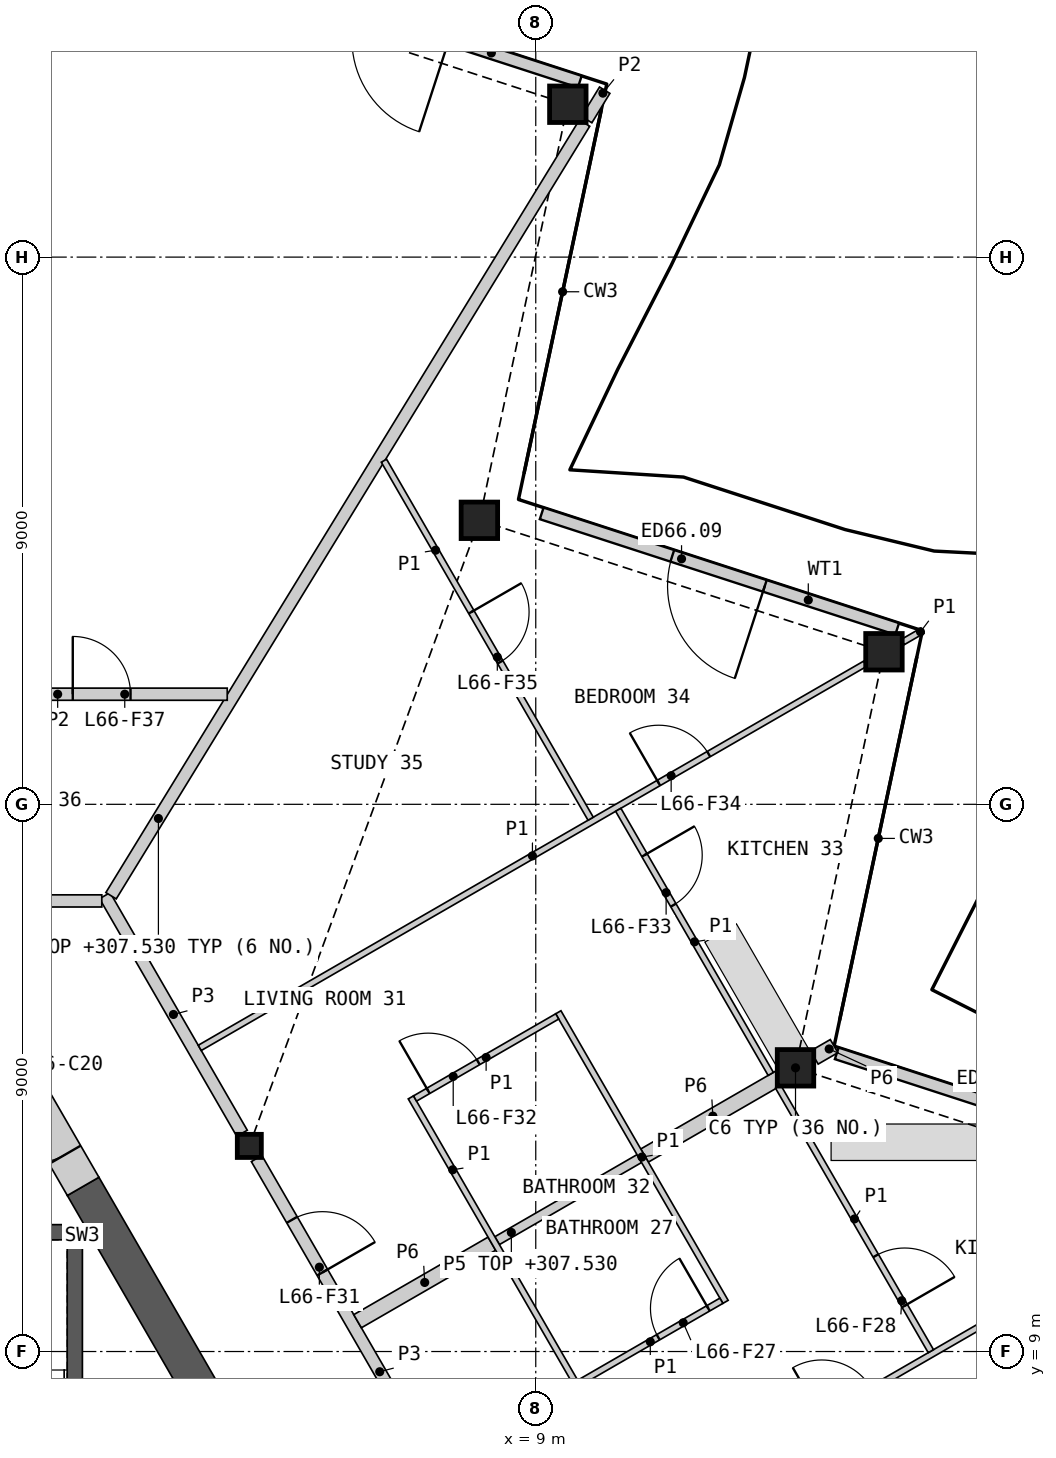
"""IFC4 building model, lengths in metres.
Left out: names, types, materials, properties, quantities, classifications, styles, units other than length and angle.
Written with IfcOpenShell. Run it as: python <this file> out.ifc"""

import sys

from ifc_helpers import new_model, si_unit, direction, frame, frame_2d, origin, origin_2d, place, context, subcontext, project, spatial, polyline, rectangle, hollow_rectangle, i_section, outline, extrude, element, fill, save


model = new_model("IFC4")
c1 = context("Model", 3, precision=1e-05, world=origin(), true_north=direction((0.0, 1.0)))
c2 = subcontext(c1, "Body", "Model", "MODEL_VIEW")
j1 = project(units=[si_unit("LENGTHUNIT", "METRE"), si_unit("PLANEANGLEUNIT", "RADIAN")], contexts=[c1])
p1 = place(None, origin())
s1 = spatial("IfcSite", under=j1, at=p1, CompositionType="ELEMENT")
p2 = place(p1, origin())
s2 = spatial("IfcBuilding", under=s1, at=p2, CompositionType="ELEMENT")
p3 = place(p2, frame((0.0, 0.0, 305.2)))
s3 = spatial("IfcBuildingStorey", under=s2, at=p3, CompositionType="ELEMENT", Elevation=305.2)
for number, where, z_axis, x_axis in (
    (1, (13.272, 13.666, 0.0), (0.0, 0.0, 1.0), (1.0, 0.0, 0.0)),
    (2, (14.727, 20.509, 0.0), (0.0, 0.0, 1.0), (1.0, 0.0, 0.0)),
    (3, (8.073, 22.671, 0.0), (0.0, 0.0, 1.0), (1.0, 0.0, 0.0)),
    (4, (9.527, 29.514, 0.0), (0.0, 0.0, 1.0), (1.0, 0.0, 0.0)),
):
    element("IfcColumn", number, at=place(p3, frame(where, z_axis=z_axis, x_axis=x_axis)), inside=s3, PredefinedType="COLUMN", context=c2, shape_type="SweptSolid", body=[
        extrude(hollow_rectangle(XDim=0.6, YDim=0.6, WallThickness=0.04, at=origin_2d()), origin(), (0.0, 0.0, 1.0), 3.4),
    ])
p4 = place(p3, frame((4.289, 12.382, 0.0), z_axis=(0.0, 0.0, 1.0), x_axis=(1.0, 0.0, 0.0)))
e5 = element("IfcColumn", 5, at=p4, inside=s3, PredefinedType="COLUMN", context=c2, shape_type="SweptSolid", body=[
    extrude(i_section(OverallWidth=0.396, OverallDepth=0.381, WebThickness=0.019, FlangeThickness=0.03, at=origin_2d()), origin(), (0.0, 0.0, 1.0), 3.4),
])
p5 = place(p3, frame((20.178, 11.88, 0.0), z_axis=(0.0, 0.0, 1.0), x_axis=(-0.951053245104, 0.309027061884, 0.0)))
e6 = element("IfcWall", 6, at=p5, inside=s3, PredefinedType="SOLIDWALL", context=c2, shape_type="SweptSolid", body=[
    extrude(rectangle(XDim=6.549, YDim=0.2, at=frame_2d((3.274, 0.0))), origin(), (0.0, 0.0, 1.0), 2.488),
])
p6 = place(p5, frame((2.334, 0.0, 0.0)))
e7 = element("IfcOpeningElement", 7, at=p6, cuts=e6, PredefinedType="OPENING", context=c2, shape_type="SweptSolid", body=[
    extrude(rectangle(XDim=1.6, YDim=2.25, at=frame_2d((0.8, 1.125))), frame((0.0, 0.11, 0.0), z_axis=(0.0, -1.0, 0.0), x_axis=(1.0, 0.0, 0.0)), (0.0, 0.0, 1.0), 0.22),
])
p7 = place(p3, frame((14.944, 20.885, 0.0), z_axis=(0.0, 0.0, 1.0), x_axis=(-0.951062668065, 0.308998060534, 0.0)))
e8 = element("IfcWall", 8, at=p7, inside=s3, PredefinedType="SOLIDWALL", context=c2, shape_type="SweptSolid", body=[
    extrude(rectangle(XDim=6.147, YDim=0.2, at=frame_2d((3.073, 0.0))), origin(), (0.0, 0.0, 1.0), 2.488),
])
p8 = place(p7, frame((2.288, 0.0, 0.0)))
e9 = element("IfcOpeningElement", 9, at=p8, cuts=e8, PredefinedType="OPENING", context=c2, shape_type="SweptSolid", body=[
    extrude(rectangle(XDim=1.6, YDim=2.25, at=frame_2d((0.8, 1.125))), frame((0.0, 0.11, 0.0), z_axis=(0.0, -1.0, 0.0), x_axis=(1.0, 0.0, 0.0)), (0.0, 0.0, 1.0), 0.22),
])
p9 = place(p3, frame((9.724, 29.885, 0.0), z_axis=(0.0, 0.0, 1.0), x_axis=(-0.951066325824, 0.30898680212, 0.0)))
e10 = element("IfcWall", 10, at=p9, inside=s3, PredefinedType="SOLIDWALL", context=c2, shape_type="SweptSolid", body=[
    extrude(rectangle(XDim=6.117, YDim=0.2, at=frame_2d((3.059, 0.0))), origin(), (0.0, 0.0, 1.0), 2.488),
])
p10 = place(p9, frame((2.259, 0.0, 0.0)))
e11 = element("IfcOpeningElement", 11, at=p10, cuts=e10, PredefinedType="OPENING", context=c2, shape_type="SweptSolid", body=[
    extrude(rectangle(XDim=1.6, YDim=2.25, at=frame_2d((0.8, 1.125))), frame((0.0, 0.11, 0.0), z_axis=(0.0, -1.0, 0.0), x_axis=(1.0, 0.0, 0.0)), (0.0, 0.0, 1.0), 0.22),
])
p11 = place(p3, origin())
e12 = element("IfcWall", 12, at=p11, inside=s3, PredefinedType="SHEAR", context=c2, shape_type="SweptSolid", body=[
    extrude(outline(polyline([(1.544, 5.237), (1.544, 11.087), (1.294, 10.837), (1.294, 5.237), (1.544, 5.237)])), origin(), (0.0, 0.0, 1.0), 3.1),
])
p12 = place(p3, origin())
e13 = element("IfcWall", 13, at=p12, inside=s3, PredefinedType="SHEAR", context=c2, shape_type="SweptSolid", body=[
    extrude(outline(polyline([(1.544, 11.087), (-1.544, 11.087), (-1.294, 10.837), (1.294, 10.837), (1.544, 11.087)])), origin(), (0.0, 0.0, 1.0), 3.1),
])
p13 = place(p3, frame((8.841, -0.902, 0.0), z_axis=(0.0, 0.0, 1.0), x_axis=(-0.499995618375, 0.866027933502, 0.0)))
e14 = element("IfcWall", 14, at=p13, inside=s3, PredefinedType="SHEAR", context=c2, shape_type="SweptSolid", body=[
    extrude(rectangle(XDim=14.571, YDim=0.6, at=frame_2d((7.285, 0.0))), origin(), (0.0, 0.0, 1.0), 3.1),
])
p14 = place(p3, frame((1.556, 11.716, 0.0), z_axis=(0.0, 0.0, 1.0), x_axis=(-0.500018667571, 0.866014625789, 0.0)))
e15 = element("IfcWall", 15, at=p14, inside=s3, PredefinedType="SHEAR", context=c2, shape_type="SweptSolid", body=[
    extrude(rectangle(XDim=2.592, YDim=0.6, at=frame_2d((1.296, 0.0))), origin(), (0.0, 0.0, 1.0), 3.1),
])
p15 = place(p14, frame((0.6, 0.0, 0.0)))
e16 = element("IfcOpeningElement", 16, at=p15, cuts=e15, PredefinedType="OPENING", context=c2, shape_type="SweptSolid", body=[
    extrude(rectangle(XDim=1.0, YDim=2.1, at=frame_2d((0.5, 1.05))), frame((0.0, 0.31, 0.0), z_axis=(0.0, -1.0, 0.0), x_axis=(1.0, 0.0, 0.0)), (0.0, 0.0, 1.0), 0.62),
])
p16 = place(p3, frame((4.409, 12.174, 0.0), z_axis=(0.0, 0.0, 1.0), x_axis=(0.499984266882, -0.866034487114, 0.0)))
e17 = element("IfcWall", 17, at=p16, inside=s3, PredefinedType="PARTITIONING", context=c2, shape_type="SweptSolid", body=[
    extrude(rectangle(XDim=8.099, YDim=0.2, at=frame_2d((4.049, 0.0))), origin(), (0.0, 0.0, 1.0), 3.1),
])
p17 = place(p16, frame((5.123, 0.0, 0.0)))
e18 = element("IfcOpeningElement", 18, at=p17, cuts=e17, PredefinedType="OPENING", context=c2, shape_type="SweptSolid", body=[
    extrude(rectangle(XDim=1.0, YDim=2.1, at=frame_2d((0.5, 1.05))), frame((0.0, 0.11, 0.0), z_axis=(0.0, -1.0, 0.0), x_axis=(1.0, 0.0, 0.0)), (0.0, 0.0, 1.0), 0.22),
])
p18 = place(p16, frame((1.164, 0.0, 0.0)))
e19 = element("IfcOpeningElement", 19, at=p18, cuts=e17, PredefinedType="OPENING", context=c2, shape_type="SweptSolid", body=[
    extrude(rectangle(XDim=1.0, YDim=2.1, at=frame_2d((0.5, 1.05))), frame((0.0, 0.11, 0.0), z_axis=(0.0, -1.0, 0.0), x_axis=(1.0, 0.0, 0.0)), (0.0, 0.0, 1.0), 0.22),
])
p19 = place(p3, frame((1.913, 16.498, 0.0), z_axis=(0.0, 0.0, 1.0), x_axis=(0.499950370306, -0.866054055606, 0.0)))
e20 = element("IfcWall", 20, at=p19, inside=s3, PredefinedType="PARTITIONING", context=c2, shape_type="SweptSolid", body=[
    extrude(rectangle(XDim=4.513, YDim=0.2, at=frame_2d((2.256, 0.0))), origin(), (0.0, 0.0, 1.0), 3.1),
])
p20 = place(p3, frame((-1.863, 16.411, 0.0), z_axis=(0.0, 0.0, 1.0), x_axis=(1.0, 0.0, 0.0)))
e21 = element("IfcWall", 21, at=p20, inside=s3, PredefinedType="PARTITIONING", context=c2, shape_type="SweptSolid", body=[
    extrude(rectangle(XDim=3.726, YDim=0.2, at=frame_2d((1.863, 0.0))), origin(), (0.0, 0.0, 1.0), 3.1),
])
p21 = place(p20, frame((1.388, 0.0, 0.0)))
e22 = element("IfcOpeningElement", 22, at=p21, cuts=e21, PredefinedType="OPENING", context=c2, shape_type="SweptSolid", body=[
    extrude(rectangle(XDim=0.95, YDim=2.1, at=frame_2d((0.475, 1.05))), frame((0.0, 0.11, 0.0), z_axis=(0.0, -1.0, 0.0), x_axis=(1.0, 0.0, 0.0)), (0.0, 0.0, 1.0), 0.22),
])
p22 = place(p3, frame((6.07, 9.498, 0.0), z_axis=(0.0, 0.0, 1.0), x_axis=(0.866054858364, 0.499948979701, 0.0)))
e23 = element("IfcWall", 23, at=p22, inside=s3, PredefinedType="PARTITIONING", context=c2, shape_type="SweptSolid", body=[
    extrude(rectangle(XDim=2.55, YDim=0.25, at=frame_2d((1.275, 0.0))), origin(), (0.0, 0.0, 1.0), 2.33),
])
p23 = place(p3, frame((10.789, 12.223, 0.0), z_axis=(0.0, 0.0, 1.0), x_axis=(0.866033547976, 0.499985893582, 0.0)))
e24 = element("IfcWall", 24, at=p23, inside=s3, PredefinedType="PARTITIONING", context=c2, shape_type="SweptSolid", body=[
    extrude(rectangle(XDim=2.594, YDim=0.25, at=frame_2d((1.297, 0.0))), origin(), (0.0, 0.0, 1.0), 2.33),
])
p24 = place(p3, frame((13.582, 13.835, 0.0), z_axis=(0.0, 0.0, 1.0), x_axis=(0.865827443207, 0.500342721131, 0.0)))
e25 = element("IfcWall", 25, at=p24, inside=s3, PredefinedType="PARTITIONING", context=c2, shape_type="SweptSolid", body=[
    extrude(rectangle(XDim=0.375, YDim=0.25, at=frame_2d((0.188, 0.0))), origin(), (0.0, 0.0, 1.0), 2.33),
])
p25 = place(p3, frame((2.015, 16.496, 0.0), z_axis=(0.0, 0.0, 1.0), x_axis=(0.522487920222, 0.852646687217, 0.0)))
e26 = element("IfcWall", 26, at=p25, inside=s3, PredefinedType="PARTITIONING", context=c2, shape_type="SweptSolid", body=[
    extrude(rectangle(XDim=14.904, YDim=0.2, at=frame_2d((7.452, 0.0))), origin(), (0.0, 0.0, 1.0), 2.33),
])
p26 = place(p3, frame((0.208, 19.811, 0.0), z_axis=(0.0, 0.0, 1.0), x_axis=(1.0, 0.0, 0.0)))
e27 = element("IfcWall", 27, at=p26, inside=s3, PredefinedType="PARTITIONING", context=c2, shape_type="SweptSolid", body=[
    extrude(rectangle(XDim=3.718, YDim=0.2, at=frame_2d((1.859, 0.0))), origin(), (0.0, 0.0, 1.0), 2.33),
])
p27 = place(p26, frame((1.178, 0.0, 0.0)))
e28 = element("IfcOpeningElement", 28, at=p27, cuts=e27, PredefinedType="OPENING", context=c2, shape_type="SweptSolid", body=[
    extrude(rectangle(XDim=0.95, YDim=2.1, at=frame_2d((0.475, 1.05))), frame((0.0, 0.11, 0.0), z_axis=(0.0, -1.0, 0.0), x_axis=(1.0, 0.0, 0.0)), (0.0, 0.0, 1.0), 0.22),
])
p28 = place(p3, frame((9.837, 29.261, 0.0), z_axis=(0.0, 0.0, 1.0), x_axis=(0.5225115935, 0.852632180168, 0.0)))
e29 = element("IfcWall", 29, at=p28, inside=s3, PredefinedType="PARTITIONING", context=c2, shape_type="SweptSolid", body=[
    extrude(rectangle(XDim=0.567, YDim=0.2, at=frame_2d((0.284, 0.0))), origin(), (0.0, 0.0, 1.0), 2.33),
])
p29 = place(p3, frame((8.365, 10.823, 0.0), z_axis=(0.0, 0.0, 1.0), x_axis=(0.866019956843, 0.50000943426, 0.0)))
e30 = element("IfcWall", 30, at=p29, inside=s3, PredefinedType="PLUMBINGWALL", context=c2, shape_type="SweptSolid", body=[
    extrude(rectangle(XDim=2.7, YDim=0.15, at=frame_2d((1.35, 0.0))), origin(), (0.0, 0.0, 1.0), 2.33),
])
p30 = place(p3, frame((3.474, 13.994, 0.0), z_axis=(0.0, 0.0, 1.0), x_axis=(0.866032424046, 0.499987840353, 0.0)))
e31 = element("IfcWall", 31, at=p30, inside=s3, PredefinedType="PARTITIONING", context=c2, shape_type="SweptSolid", body=[
    extrude(rectangle(XDim=12.635, YDim=0.1, at=frame_2d((6.317, 0.0))), origin(), (0.0, 0.0, 1.0), 2.33),
])
p31 = place(p30, frame((8.714, 0.0, 0.0)))
e32 = element("IfcOpeningElement", 32, at=p31, cuts=e31, PredefinedType="OPENING", context=c2, shape_type="SweptSolid", body=[
    extrude(rectangle(XDim=0.95, YDim=2.1, at=frame_2d((0.475, 1.05))), frame((0.0, 0.06, 0.0), z_axis=(0.0, -1.0, 0.0), x_axis=(1.0, 0.0, 0.0)), (0.0, 0.0, 1.0), 0.12),
])
p32 = place(p3, frame((8.786, 5.073, 0.0), z_axis=(0.0, 0.0, 1.0), x_axis=(0.86602139559, 0.500006942333, 0.0)))
e33 = element("IfcWall", 33, at=p32, inside=s3, PredefinedType="PARTITIONING", context=c2, shape_type="SweptSolid", body=[
    extrude(rectangle(XDim=12.505, YDim=0.1, at=frame_2d((6.252, 0.0))), origin(), (0.0, 0.0, 1.0), 2.33),
])
p33 = place(p32, frame((5.677, 0.0, 0.0)))
e34 = element("IfcOpeningElement", 34, at=p33, cuts=e33, PredefinedType="OPENING", context=c2, shape_type="SweptSolid", body=[
    extrude(rectangle(XDim=0.95, YDim=2.1, at=frame_2d((0.475, 1.05))), frame((0.0, 0.06, 0.0), z_axis=(0.0, -1.0, 0.0), x_axis=(1.0, 0.0, 0.0)), (0.0, 0.0, 1.0), 0.12),
])
p34 = place(p3, frame((6.503, 23.652, 0.0), z_axis=(0.0, 0.0, 1.0), x_axis=(0.50002393615, -0.866011583801, 0.0)))
e35 = element("IfcWall", 35, at=p34, inside=s3, PredefinedType="PARTITIONING", context=c2, shape_type="SweptSolid", body=[
    extrude(rectangle(XDim=6.8, YDim=0.1, at=frame_2d((3.4, 0.0))), origin(), (0.0, 0.0, 1.0), 2.33),
])
p35 = place(p34, frame((2.874, 0.0, 0.0)))
e36 = element("IfcOpeningElement", 36, at=p35, cuts=e35, PredefinedType="OPENING", context=c2, shape_type="SweptSolid", body=[
    extrude(rectangle(XDim=0.95, YDim=2.1, at=frame_2d((0.475, 1.05))), frame((0.0, 0.06, 0.0), z_axis=(0.0, -1.0, 0.0), x_axis=(1.0, 0.0, 0.0)), (0.0, 0.0, 1.0), 0.12),
])
p36 = place(p3, frame((9.371, 14.58, 0.0), z_axis=(0.0, 0.0, 1.0), x_axis=(0.499996545922, -0.866027397988, 0.0)))
e37 = element("IfcWall", 37, at=p36, inside=s3, PredefinedType="PARTITIONING", context=c2, shape_type="SweptSolid", body=[
    extrude(rectangle(XDim=5.5, YDim=0.1, at=frame_2d((2.75, 0.0))), origin(), (0.0, 0.0, 1.0), 2.33),
])
p37 = place(p3, frame((6.946, 13.18, 0.0), z_axis=(0.0, 0.0, 1.0), x_axis=(0.500015767406, -0.866016300277, 0.0)))
e38 = element("IfcWall", 38, at=p37, inside=s3, PredefinedType="PARTITIONING", context=c2, shape_type="SweptSolid", body=[
    extrude(rectangle(XDim=5.5, YDim=0.1, at=frame_2d((2.75, 0.0))), origin(), (0.0, 0.0, 1.0), 2.33),
])
p38 = place(p3, frame((10.357, 17.91, 0.0), z_axis=(0.0, 0.0, 1.0), x_axis=(0.50000754391, -0.866021048262, 0.0)))
e39 = element("IfcWall", 39, at=p38, inside=s3, PredefinedType="PARTITIONING", context=c2, shape_type="SweptSolid", body=[
    extrude(rectangle(XDim=5.016, YDim=0.1, at=frame_2d((2.508, 0.0))), origin(), (0.0, 0.0, 1.0), 2.33),
])
p39 = place(p38, frame((0.861, 0.0, 0.0)))
e40 = element("IfcOpeningElement", 40, at=p39, cuts=e39, PredefinedType="OPENING", context=c2, shape_type="SweptSolid", body=[
    extrude(rectangle(XDim=0.95, YDim=2.1, at=frame_2d((0.475, 1.05))), frame((0.0, 0.06, 0.0), z_axis=(0.0, -1.0, 0.0), x_axis=(1.0, 0.0, 0.0)), (0.0, 0.0, 1.0), 0.12),
])
p40 = place(p3, frame((12.986, 13.356, 0.0), z_axis=(0.0, 0.0, 1.0), x_axis=(0.500007128048, -0.866021288365, 0.0)))
e41 = element("IfcWall", 41, at=p40, inside=s3, PredefinedType="PARTITIONING", context=c2, shape_type="SweptSolid", body=[
    extrude(rectangle(XDim=5.023, YDim=0.1, at=frame_2d((2.512, 0.0))), origin(), (0.0, 0.0, 1.0), 2.33),
])
p41 = place(p40, frame((3.211, 0.0, 0.0)))
e42 = element("IfcOpeningElement", 42, at=p41, cuts=e41, PredefinedType="OPENING", context=c2, shape_type="SweptSolid", body=[
    extrude(rectangle(XDim=0.95, YDim=2.1, at=frame_2d((0.475, 1.05))), frame((0.0, 0.06, 0.0), z_axis=(0.0, -1.0, 0.0), x_axis=(1.0, 0.0, 0.0)), (0.0, 0.0, 1.0), 0.12),
])
p42 = place(p3, frame((7.015, 13.162, 0.0), z_axis=(0.0, 0.0, 1.0), x_axis=(0.866036505625, 0.499980770555, 0.0)))
e43 = element("IfcWall", 43, at=p42, inside=s3, PredefinedType="PARTITIONING", context=c2, shape_type="SweptSolid", body=[
    extrude(rectangle(XDim=2.7, YDim=0.1, at=frame_2d((1.35, 0.0))), origin(), (0.0, 0.0, 1.0), 2.33),
])
p43 = place(p42, frame((0.25, 0.0, 0.0)))
e44 = element("IfcOpeningElement", 44, at=p43, cuts=e43, PredefinedType="OPENING", context=c2, shape_type="SweptSolid", body=[
    extrude(rectangle(XDim=0.95, YDim=2.1, at=frame_2d((0.475, 1.05))), frame((0.0, 0.06, 0.0), z_axis=(0.0, -1.0, 0.0), x_axis=(1.0, 0.0, 0.0)), (0.0, 0.0, 1.0), 0.12),
])
p44 = place(p3, frame((9.715, 8.485, 0.0), z_axis=(0.0, 0.0, 1.0), x_axis=(0.866036505625, 0.499980770555, 0.0)))
e45 = element("IfcWall", 45, at=p44, inside=s3, PredefinedType="PARTITIONING", context=c2, shape_type="SweptSolid", body=[
    extrude(rectangle(XDim=2.7, YDim=0.1, at=frame_2d((1.35, 0.0))), origin(), (0.0, 0.0, 1.0), 2.33),
])
p45 = place(p44, frame((1.5, 0.0, 0.0)))
e46 = element("IfcOpeningElement", 46, at=p45, cuts=e45, PredefinedType="OPENING", context=c2, shape_type="SweptSolid", body=[
    extrude(rectangle(XDim=0.95, YDim=2.1, at=frame_2d((0.475, 1.05))), frame((0.0, 0.06, 0.0), z_axis=(0.0, -1.0, 0.0), x_axis=(1.0, 0.0, 0.0)), (0.0, 0.0, 1.0), 0.12),
])
p46 = place(p3, frame((15.037, 20.669, 0.0), z_axis=(0.0, 0.0, 1.0), x_axis=(0.865770353626, 0.500441499861, 0.0)))
e47 = element("IfcWall", 47, at=p46, inside=s3, PredefinedType="PARTITIONING", context=c2, shape_type="SweptSolid", body=[
    extrude(rectangle(XDim=0.372, YDim=0.1, at=frame_2d((0.186, 0.0))), origin(), (0.0, 0.0, 1.0), 2.33),
])
p47 = place(p8, origin())
e48 = element("IfcDoor", 48, at=p47, inside=s3, OperationType="DOUBLE_DOOR_SINGLE_SWING", PredefinedType="DOOR", context=c2, shape_type="SweptSolid", body=[
    extrude(rectangle(XDim=1.6, YDim=2.25, at=frame_2d((0.8, 1.125))), frame((0.0, 0.025, 0.0), z_axis=(0.0, -1.0, 0.0), x_axis=(1.0, 0.0, 0.0)), (0.0, 0.0, 1.0), 0.05),
])
fill(e9, e48)
p48 = place(p15, origin())
e49 = element("IfcDoor", 49, at=p48, inside=s3, OperationType="SINGLE_SWING_RIGHT", PredefinedType="DOOR", context=c2, shape_type="SweptSolid", body=[
    extrude(rectangle(XDim=1.0, YDim=2.1, at=frame_2d((0.5, 1.05))), frame((0.0, 0.055, 0.0), z_axis=(0.0, -1.0, 0.0), x_axis=(1.0, 0.0, 0.0)), (0.0, 0.0, 1.0), 0.05),
])
fill(e16, e49)
p49 = place(p45, origin())
e50 = element("IfcDoor", 50, at=p49, inside=s3, OperationType="SINGLE_SWING_RIGHT", PredefinedType="DOOR", context=c2, shape_type="SweptSolid", body=[
    extrude(rectangle(XDim=0.95, YDim=2.1, at=frame_2d((0.475, 1.05))), frame((0.0, 0.025, 0.0), z_axis=(0.0, -1.0, 0.0), x_axis=(1.0, 0.0, 0.0)), (0.0, 0.0, 1.0), 0.05),
])
fill(e46, e50)
p50 = place(p41, origin())
e51 = element("IfcDoor", 51, at=p50, inside=s3, OperationType="SINGLE_SWING_RIGHT", PredefinedType="DOOR", context=c2, shape_type="SweptSolid", body=[
    extrude(rectangle(XDim=0.95, YDim=2.1, at=frame_2d((0.475, 1.05))), frame((0.0, 0.025, 0.0), z_axis=(0.0, -1.0, 0.0), x_axis=(1.0, 0.0, 0.0)), (0.0, 0.0, 1.0), 0.05),
])
fill(e42, e51)
p51 = place(p18, origin())
e52 = element("IfcDoor", 52, at=p51, inside=s3, OperationType="SINGLE_SWING_RIGHT", PredefinedType="DOOR", context=c2, shape_type="SweptSolid", body=[
    extrude(rectangle(XDim=1.0, YDim=2.1, at=frame_2d((0.5, 1.05))), frame((0.0, 0.025, 0.0), z_axis=(0.0, -1.0, 0.0), x_axis=(1.0, 0.0, 0.0)), (0.0, 0.0, 1.0), 0.05),
])
fill(e19, e52)
p52 = place(p43, origin())
e53 = element("IfcDoor", 53, at=p52, inside=s3, OperationType="SINGLE_SWING_LEFT", PredefinedType="DOOR", context=c2, shape_type="SweptSolid", body=[
    extrude(rectangle(XDim=0.95, YDim=2.1, at=frame_2d((0.475, 1.05))), frame((0.0, 0.025, 0.0), z_axis=(0.0, -1.0, 0.0), x_axis=(1.0, 0.0, 0.0)), (0.0, 0.0, 1.0), 0.05),
])
fill(e44, e53)
p53 = place(p39, origin())
e54 = element("IfcDoor", 54, at=p53, inside=s3, OperationType="SINGLE_SWING_LEFT", PredefinedType="DOOR", context=c2, shape_type="SweptSolid", body=[
    extrude(rectangle(XDim=0.95, YDim=2.1, at=frame_2d((0.475, 1.05))), frame((0.0, 0.025, 0.0), z_axis=(0.0, -1.0, 0.0), x_axis=(1.0, 0.0, 0.0)), (0.0, 0.0, 1.0), 0.05),
])
fill(e40, e54)
p54 = place(p31, origin())
e55 = element("IfcDoor", 55, at=p54, inside=s3, OperationType="SINGLE_SWING_LEFT", PredefinedType="DOOR", context=c2, shape_type="SweptSolid", body=[
    extrude(rectangle(XDim=0.95, YDim=2.1, at=frame_2d((0.475, 1.05))), frame((0.0, 0.025, 0.0), z_axis=(0.0, -1.0, 0.0), x_axis=(1.0, 0.0, 0.0)), (0.0, 0.0, 1.0), 0.05),
])
fill(e32, e55)
p55 = place(p35, origin())
e56 = element("IfcDoor", 56, at=p55, inside=s3, OperationType="SINGLE_SWING_LEFT", PredefinedType="DOOR", context=c2, shape_type="SweptSolid", body=[
    extrude(rectangle(XDim=0.95, YDim=2.1, at=frame_2d((0.475, 1.05))), frame((0.0, 0.025, 0.0), z_axis=(0.0, -1.0, 0.0), x_axis=(1.0, 0.0, 0.0)), (0.0, 0.0, 1.0), 0.05),
])
fill(e36, e56)
p56 = place(p27, origin())
e57 = element("IfcDoor", 57, at=p56, inside=s3, OperationType="SINGLE_SWING_LEFT", PredefinedType="DOOR", context=c2, shape_type="SweptSolid", body=[
    extrude(rectangle(XDim=0.95, YDim=2.1, at=frame_2d((0.475, 1.05))), frame((0.0, 0.025, 0.0), z_axis=(0.0, -1.0, 0.0), x_axis=(1.0, 0.0, 0.0)), (0.0, 0.0, 1.0), 0.05),
])
fill(e28, e57)
save(model, sys.argv[1])
